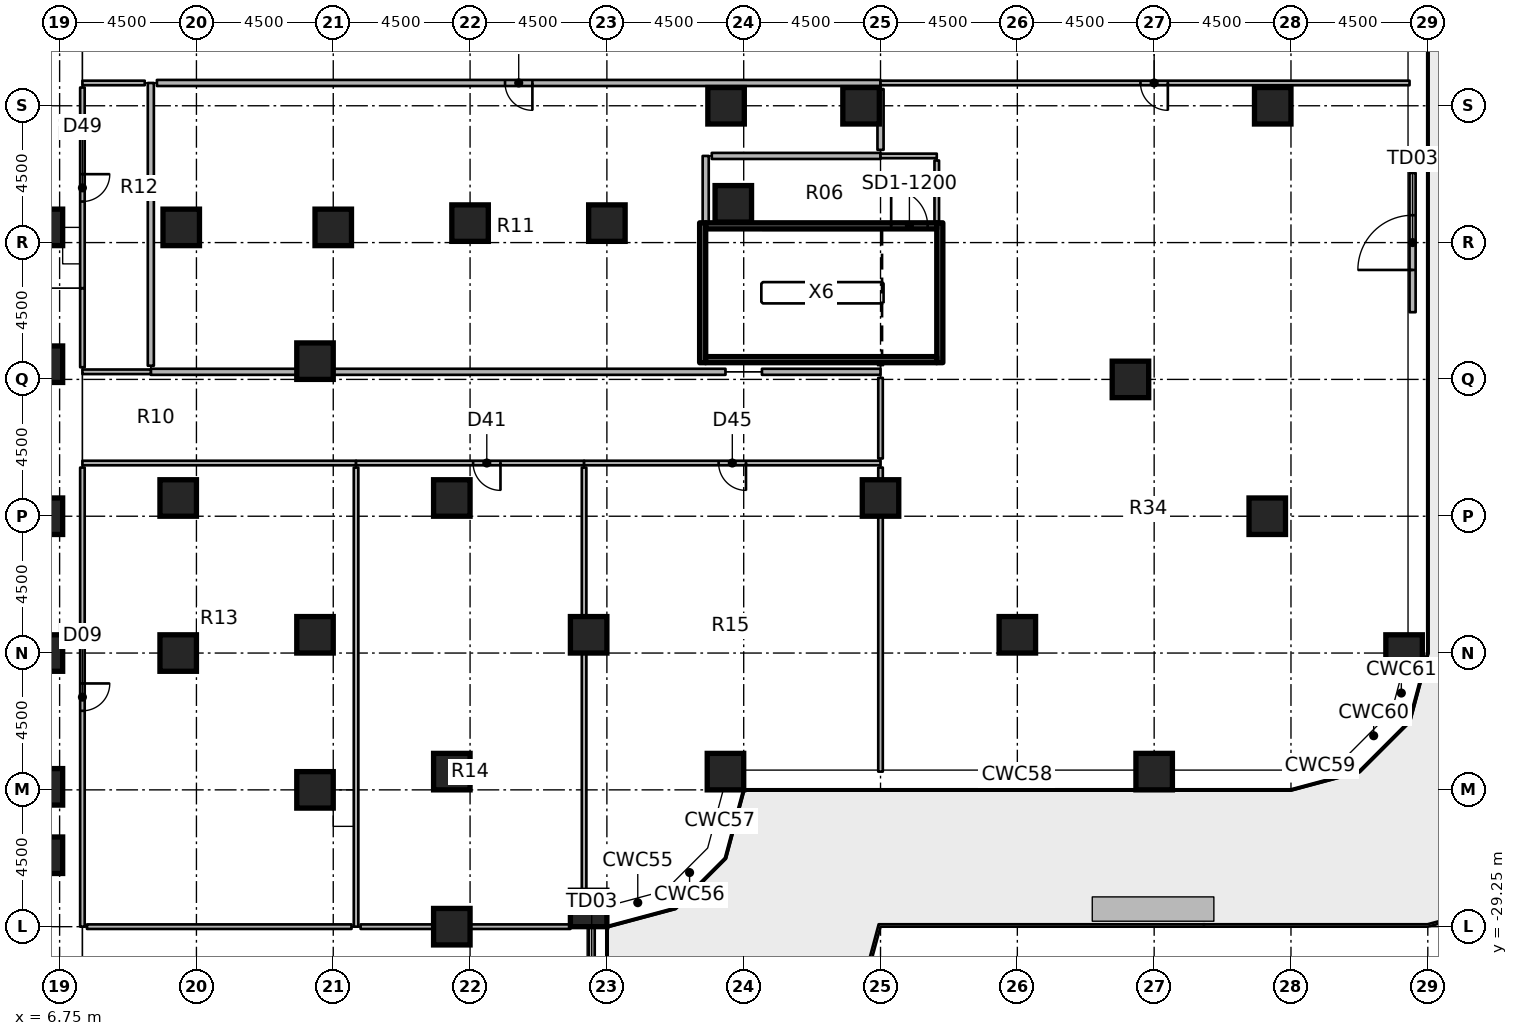
"""IFC4 building model, lengths in metres.
Left out: names, types, materials, properties, quantities, classifications, styles, units other than length and angle.
Written with IfcOpenShell. Run it as: python <this file> out.ifc"""

import sys

from ifc_helpers import new_model, si_unit, direction, frame, frame_2d, origin, origin_2d, place, context, subcontext, project, spatial, rectangle, extrude, element, fill, save


model = new_model("IFC4")
c1 = context("Model", 3, precision=1e-05, world=origin(), true_north=direction((0.0, 1.0)))
c2 = subcontext(c1, "Body", "Model", "MODEL_VIEW")
j1 = project(units=[si_unit("LENGTHUNIT", "METRE"), si_unit("PLANEANGLEUNIT", "RADIAN")], contexts=[c1])
p1 = place(None, origin())
s1 = spatial("IfcSite", under=j1, at=p1, CompositionType="ELEMENT")
p2 = place(p1, origin())
s2 = spatial("IfcBuilding", under=s1, at=p2, CompositionType="ELEMENT")
p3 = place(p2, frame((0.0, 0.0, 7.0)))
s3 = spatial("IfcBuildingStorey", under=s2, at=p3, CompositionType="ELEMENT", Elevation=7.0)
for number, where, z_axis, x_axis in (
    (1, (6.25, -26.9, 0.0), (0.0, 0.0, 1.0), (1.0, 0.0, 0.0)),
    (2, (6.25, -24.65, 0.0), (0.0, 0.0, 1.0), (1.0, 0.0, 0.0)),
    (3, (6.25, -20.25, 0.0), (0.0, 0.0, 1.0), (1.0, 0.0, 0.0)),
    (4, (6.25, -15.75, 0.0), (0.0, 0.0, 1.0), (1.0, 0.0, 0.0)),
    (5, (6.25, -10.75, 0.0), (0.0, 0.0, 1.0), (1.0, 0.0, 0.0)),
    (6, (6.25, -6.25, 0.0), (0.0, 0.0, 1.0), (1.0, 0.0, 0.0)),
    (7, (10.65, -20.25, 0.0), (0.0, 0.0, 1.0), (1.0, 0.0, 0.0)),
    (8, (10.65, -15.15, 0.0), (0.0, 0.0, 1.0), (1.0, 0.0, 0.0)),
    (9, (10.75, -6.25, 0.0), (0.0, 0.0, 1.0), (1.0, 0.0, 0.0)),
    (10, (15.15, -24.75, 0.0), (0.0, 0.0, 1.0), (1.0, 0.0, 0.0)),
    (11, (15.15, -19.65, 0.0), (0.0, 0.0, 1.0), (1.0, 0.0, 0.0)),
    (12, (15.15, -10.65, 0.0), (0.0, 0.0, 1.0), (1.0, 0.0, 0.0)),
    (13, (15.75, -6.25, 0.0), (0.0, 0.0, 1.0), (1.0, 0.0, 0.0)),
    (14, (19.65, -29.25, 0.0), (0.0, 0.0, 1.0), (1.0, 0.0, 0.0)),
    (15, (19.65, -24.15, 0.0), (0.0, 0.0, 1.0), (1.0, 0.0, 0.0)),
    (16, (19.65, -15.15, 0.0), (0.0, 0.0, 1.0), (1.0, 0.0, 0.0)),
    (17, (20.25, -6.11, 0.0), (0.0, 0.0, 1.0), (1.0, 0.0, 0.0)),
    (18, (24.15, -28.65, 0.0), (0.0, 0.0, 1.0), (1.0, 0.0, 0.0)),
    (19, (24.15, -19.65, 0.0), (0.0, 0.0, 1.0), (1.0, 0.0, 0.0)),
    (20, (24.75, -6.11, 0.0), (0.0, 0.0, 1.0), (1.0, 0.0, 0.0)),
    (21, (28.65, -24.15, 0.0), (0.0, 0.0, 1.0), (1.0, 0.0, 0.0)),
    (22, (28.908, -5.475, 0.0), (0.0, 0.0, 1.0), (1.0, 0.0, 0.0)),
    (23, (28.67, -2.25, 0.0), (0.0, 0.0, 1.0), (1.0, 0.0, 0.0)),
    (24, (33.75, -15.15, 0.0), (0.0, 0.0, 1.0), (1.0, 0.0, 0.0)),
    (25, (33.11, -2.25, 0.0), (0.0, 0.0, 1.0), (1.0, 0.0, 0.0)),
    (26, (38.25, -19.65, 0.0), (0.0, 0.0, 1.0), (1.0, 0.0, 0.0)),
    (27, (42.75, -24.15, 0.0), (0.0, 0.0, 1.0), (1.0, 0.0, 0.0)),
    (28, (41.97, -11.25, 0.0), (0.0, 0.0, 1.0), (1.0, 0.0, 0.0)),
    (29, (46.47, -15.75, 0.0), (0.0, 0.0, 1.0), (1.0, 0.0, 0.0)),
    (30, (46.65, -2.25, 0.0), (0.0, 0.0, 1.0), (1.0, 0.0, 0.0)),
    (31, (50.97, -20.25, 0.0), (0.0, 0.0, 1.0), (1.0, 0.0, 0.0)),
):
    element("IfcColumn", number, at=place(p3, frame(where, z_axis=z_axis, x_axis=x_axis)), inside=s3, PredefinedType="COLUMN", context=c2, shape_type="SweptSolid", body=[
        extrude(rectangle(XDim=1.2, YDim=1.2, at=origin_2d()), origin(), (0.0, 0.0, 1.0), 4.55),
    ])
p4 = place(p3, frame((24.25, -33.15, 0.0), z_axis=(0.0, 0.0, 1.0), x_axis=(0.0, 1.0, 0.0)))
e32 = element("IfcWall", 32, at=p4, inside=s3, PredefinedType="SOLIDWALL", context=c2, shape_type="SweptSolid", body=[
    extrude(rectangle(XDim=3.9, YDim=0.2, at=frame_2d((1.95, 0.0))), origin(), (0.0, 0.0, 1.0), 4.55),
])
p5 = place(p4, frame((1.05, 0.0, 0.0)))
e33 = element("IfcOpeningElement", 33, at=p5, cuts=e32, PredefinedType="OPENING", context=c2, shape_type="SweptSolid", body=[
    extrude(rectangle(XDim=1.8, YDim=2.4, at=frame_2d((0.9, 1.2))), frame((0.0, 0.11, 0.0), z_axis=(0.0, -1.0, 0.0), x_axis=(1.0, 0.0, 0.0)), (0.0, 0.0, 1.0), 0.22),
])
p6 = place(p3, frame((51.25, -9.04, 0.0), z_axis=(0.0, 0.0, 1.0), x_axis=(0.0, 1.0, 0.0)))
e34 = element("IfcWall", 34, at=p6, inside=s3, PredefinedType="SOLIDWALL", context=c2, shape_type="SweptSolid", body=[
    extrude(rectangle(XDim=4.58, YDim=0.2, at=frame_2d((2.29, 0.0))), origin(), (0.0, 0.0, 1.0), 4.55),
])
p7 = place(p6, frame((1.39, 0.0, 0.0)))
e35 = element("IfcOpeningElement", 35, at=p7, cuts=e34, PredefinedType="OPENING", context=c2, shape_type="SweptSolid", body=[
    extrude(rectangle(XDim=1.8, YDim=2.4, at=frame_2d((0.9, 1.2))), frame((0.0, 0.11, 0.0), z_axis=(0.0, -1.0, 0.0), x_axis=(1.0, 0.0, 0.0)), (0.0, 0.0, 1.0), 0.22),
])
for number, where, z_axis, x_axis in (
    (36, (27.9, -10.7, 0.0), (0.0, 0.0, 1.0), (0.0, 1.0, 0.0)),
    (37, (35.7, -10.7, 0.0), (0.0, 0.0, 1.0), (0.0, 1.0, 0.0)),
):
    element("IfcWall", number, at=place(p3, frame(where, z_axis=z_axis, x_axis=x_axis)), inside=s3, PredefinedType="SHEAR", context=c2, shape_type="SweptSolid", body=[
        extrude(rectangle(XDim=4.6, YDim=0.2, at=frame_2d((2.3, 0.0))), origin(), (0.0, 0.0, 1.0), 4.55),
    ])
p8 = place(p3, frame((28.0, -10.6, 0.0), z_axis=(0.0, 0.0, 1.0), x_axis=(1.0, 0.0, 0.0)))
e38 = element("IfcWall", 38, at=p8, inside=s3, PredefinedType="SHEAR", context=c2, shape_type="SweptSolid", body=[
    extrude(rectangle(XDim=7.6, YDim=0.2, at=frame_2d((3.8, 0.0))), origin(), (0.0, 0.0, 1.0), 4.55),
])
p9 = place(p3, frame((28.0, -6.2, 0.0), z_axis=(0.0, 0.0, 1.0), x_axis=(1.0, 0.0, 0.0)))
e39 = element("IfcWall", 39, at=p9, inside=s3, PredefinedType="SHEAR", context=c2, shape_type="SweptSolid", body=[
    extrude(rectangle(XDim=7.6, YDim=0.2, at=frame_2d((3.8, 0.0))), origin(), (0.0, 0.0, 1.0), 4.55),
])
p10 = place(p9, frame((6.1, 0.0, 0.0)))
e40 = element("IfcOpeningElement", 40, at=p10, cuts=e39, PredefinedType="OPENING", context=c2, shape_type="SweptSolid", body=[
    extrude(rectangle(XDim=1.2, YDim=2.1, at=frame_2d((0.6, 1.05))), frame((0.0, 0.11, 0.0), z_axis=(0.0, -1.0, 0.0), x_axis=(1.0, 0.0, 0.0)), (0.0, 0.0, 1.0), 0.22),
])
p11 = place(p3, frame((28.0, -6.1, 0.0), z_axis=(0.0, 0.0, 1.0), x_axis=(0.0, 1.0, 0.0)))
e41 = element("IfcWall", 41, at=p11, inside=s3, PredefinedType="PARTITIONING", context=c2, shape_type="SweptSolid", body=[
    extrude(rectangle(XDim=2.2, YDim=0.2, at=frame_2d((1.1, 0.0))), origin(), (0.0, 0.0, 1.0), 4.55),
])
p12 = place(p3, frame((28.2, -3.9, 0.0), z_axis=(0.0, 0.0, 1.0), x_axis=(1.0, 0.0, 0.0)))
e42 = element("IfcWall", 42, at=p12, inside=s3, PredefinedType="PARTITIONING", context=c2, shape_type="SweptSolid", body=[
    extrude(rectangle(XDim=5.55, YDim=0.2, at=frame_2d((2.775, 0.0))), origin(), (0.0, 0.0, 1.0), 4.55),
])
p13 = place(p3, frame((33.75, -3.9, 0.0), z_axis=(0.0, 0.0, 1.0), x_axis=(1.0, 0.0, 0.0)))
e43 = element("IfcWall", 43, at=p13, inside=s3, PredefinedType="PARTITIONING", context=c2, shape_type="SweptSolid", body=[
    extrude(rectangle(XDim=1.85, YDim=0.15, at=frame_2d((0.925, 0.0))), origin(), (0.0, 0.0, 1.0), 4.55),
])
p14 = place(p3, frame((35.6, -4.05, 0.0), z_axis=(0.0, 0.0, 1.0), x_axis=(0.0, -1.0, 0.0)))
e44 = element("IfcWall", 44, at=p14, inside=s3, PredefinedType="PARTITIONING", context=c2, shape_type="SweptSolid", body=[
    extrude(rectangle(XDim=2.05, YDim=0.15, at=frame_2d((1.025, 0.0))), origin(), (0.0, 0.0, 1.0), 4.55),
])
p15 = place(p3, frame((9.75, -11.0, 0.0), z_axis=(0.0, 0.0, 1.0), x_axis=(1.0, 0.0, 0.0)))
e45 = element("IfcWall", 45, at=p15, inside=s3, PredefinedType="PARTITIONING", context=c2, shape_type="SweptSolid", body=[
    extrude(rectangle(XDim=4.8, YDim=0.2, at=frame_2d((2.4, 0.0))), origin(), (0.0, 0.0, 1.0), 4.55),
])
p16 = place(p3, frame((15.75, -11.0, 0.0), z_axis=(0.0, 0.0, 1.0), x_axis=(1.0, 0.0, 0.0)))
e46 = element("IfcWall", 46, at=p16, inside=s3, PredefinedType="PARTITIONING", context=c2, shape_type="SweptSolid", body=[
    extrude(rectangle(XDim=12.9, YDim=0.2, at=frame_2d((6.45, 0.0))), origin(), (0.0, 0.0, 1.0), 4.55),
])
p17 = place(p3, frame((29.85, -11.0, 0.0), z_axis=(0.0, 0.0, 1.0), x_axis=(1.0, 0.0, 0.0)))
e47 = element("IfcWall", 47, at=p17, inside=s3, PredefinedType="PARTITIONING", context=c2, shape_type="SweptSolid", body=[
    extrude(rectangle(XDim=3.9, YDim=0.2, at=frame_2d((1.95, 0.0))), origin(), (0.0, 0.0, 1.0), 4.55),
])
p18 = place(p3, frame((7.5, -11.0, 0.0), z_axis=(0.0, 0.0, 1.0), x_axis=(1.0, 0.0, 0.0)))
e48 = element("IfcWall", 48, at=p18, inside=s3, PredefinedType="PARTITIONING", context=c2, shape_type="SweptSolid", body=[
    extrude(rectangle(XDim=2.25, YDim=0.15, at=frame_2d((1.125, 0.0))), origin(), (0.0, 0.0, 1.0), 4.55),
])
p19 = place(p3, frame((16.5, -14.0, 0.0), z_axis=(0.0, 0.0, 1.0), x_axis=(-1.0, 0.0, 0.0)))
e49 = element("IfcWall", 49, at=p19, inside=s3, PredefinedType="PARTITIONING", context=c2, shape_type="SweptSolid", body=[
    extrude(rectangle(XDim=9.0, YDim=0.15, at=frame_2d((4.5, 0.0))), origin(), (0.0, 0.0, 1.0), 4.55),
])
p20 = place(p3, frame((24.0, -14.0, 0.0), z_axis=(0.0, 0.0, 1.0), x_axis=(-1.0, 0.0, 0.0)))
e50 = element("IfcWall", 50, at=p20, inside=s3, PredefinedType="PARTITIONING", context=c2, shape_type="SweptSolid", body=[
    extrude(rectangle(XDim=7.5, YDim=0.15, at=frame_2d((3.75, 0.0))), origin(), (0.0, 0.0, 1.0), 4.55),
])
p21 = place(p20, frame((2.75, 0.0, 0.0)))
e51 = element("IfcOpeningElement", 51, at=p21, cuts=e50, PredefinedType="OPENING", context=c2, shape_type="SweptSolid", body=[
    extrude(rectangle(XDim=0.9, YDim=2.1, at=frame_2d((0.45, 1.05))), frame((0.0, 0.085, 0.0), z_axis=(0.0, -1.0, 0.0), x_axis=(1.0, 0.0, 0.0)), (0.0, 0.0, 1.0), 0.17),
])
p22 = place(p3, frame((33.75, -14.0, 0.0), z_axis=(0.0, 0.0, 1.0), x_axis=(-1.0, 0.0, 0.0)))
e52 = element("IfcWall", 52, at=p22, inside=s3, PredefinedType="PARTITIONING", context=c2, shape_type="SweptSolid", body=[
    extrude(rectangle(XDim=9.75, YDim=0.15, at=frame_2d((4.875, 0.0))), origin(), (0.0, 0.0, 1.0), 4.55),
])
p23 = place(p22, frame((4.425, 0.0, 0.0)))
e53 = element("IfcOpeningElement", 53, at=p23, cuts=e52, PredefinedType="OPENING", context=c2, shape_type="SweptSolid", body=[
    extrude(rectangle(XDim=0.9, YDim=2.1, at=frame_2d((0.45, 1.05))), frame((0.0, 0.085, 0.0), z_axis=(0.0, -1.0, 0.0), x_axis=(1.0, 0.0, 0.0)), (0.0, 0.0, 1.0), 0.17),
])
p24 = place(p3, frame((33.75, -11.2, 0.0), z_axis=(0.0, 0.0, 1.0), x_axis=(0.0, -1.0, 0.0)))
e54 = element("IfcWall", 54, at=p24, inside=s3, PredefinedType="PARTITIONING", context=c2, shape_type="SweptSolid", body=[
    extrude(rectangle(XDim=2.65, YDim=0.15, at=frame_2d((1.325, 0.0))), origin(), (0.0, 0.0, 1.0), 4.55),
])
p25 = place(p3, frame((9.75, -10.8, 0.0), z_axis=(0.0, 0.0, 1.0), x_axis=(0.0, 1.0, 0.0)))
e55 = element("IfcWall", 55, at=p25, inside=s3, PredefinedType="PARTITIONING", context=c2, shape_type="SweptSolid", body=[
    extrude(rectangle(XDim=9.3, YDim=0.2, at=frame_2d((4.65, 0.0))), origin(), (0.0, 0.0, 1.0), 4.55),
])
p26 = place(p3, frame((33.75, -1.5, 0.0), z_axis=(0.0, 0.0, 1.0), x_axis=(-1.0, 0.0, 0.0)))
e56 = element("IfcWall", 56, at=p26, inside=s3, PredefinedType="PARTITIONING", context=c2, shape_type="SweptSolid", body=[
    extrude(rectangle(XDim=23.8, YDim=0.2, at=frame_2d((11.9, 0.0))), origin(), (0.0, 0.0, 1.0), 4.55),
])
p27 = place(p26, frame((11.45, 0.0, 0.0)))
e57 = element("IfcOpeningElement", 57, at=p27, cuts=e56, PredefinedType="OPENING", context=c2, shape_type="SweptSolid", body=[
    extrude(rectangle(XDim=0.9, YDim=2.1, at=frame_2d((0.45, 1.05))), frame((0.0, 0.11, 0.0), z_axis=(0.0, -1.0, 0.0), x_axis=(1.0, 0.0, 0.0)), (0.0, 0.0, 1.0), 0.22),
])
p28 = place(p3, frame((33.75, -1.7, 0.0), z_axis=(0.0, 0.0, 1.0), x_axis=(0.0, -1.0, 0.0)))
e58 = element("IfcWall", 58, at=p28, inside=s3, PredefinedType="PARTITIONING", context=c2, shape_type="SweptSolid", body=[
    extrude(rectangle(XDim=2.0, YDim=0.2, at=frame_2d((1.0, 0.0))), origin(), (0.0, 0.0, 1.0), 4.55),
])
p29 = place(p3, frame((7.5, -10.85, 0.0), z_axis=(0.0, 0.0, 1.0), x_axis=(0.0, 1.0, 0.0)))
e59 = element("IfcWall", 59, at=p29, inside=s3, PredefinedType="PARTITIONING", context=c2, shape_type="SweptSolid", body=[
    extrude(rectangle(XDim=2.6, YDim=0.15, at=frame_2d((1.3, 0.0))), origin(), (0.0, 0.0, 1.0), 4.55),
])
p30 = place(p3, frame((7.5, -1.5, 0.0), z_axis=(0.0, 0.0, 1.0), x_axis=(1.0, 0.0, 0.0)))
e60 = element("IfcWall", 60, at=p30, inside=s3, PredefinedType="PARTITIONING", context=c2, shape_type="SweptSolid", body=[
    extrude(rectangle(XDim=2.05, YDim=0.15, at=frame_2d((1.025, 0.0))), origin(), (0.0, 0.0, 1.0), 4.55),
])
p31 = place(p3, frame((7.5, -1.65, 0.0), z_axis=(0.0, 0.0, 1.0), x_axis=(0.0, -1.0, 0.0)))
e61 = element("IfcWall", 61, at=p31, inside=s3, PredefinedType="PARTITIONING", context=c2, shape_type="SweptSolid", body=[
    extrude(rectangle(XDim=6.6, YDim=0.15, at=frame_2d((3.3, 0.0))), origin(), (0.0, 0.0, 1.0), 4.55),
])
p32 = place(p31, frame((2.85, 0.0, 0.0)))
e62 = element("IfcOpeningElement", 62, at=p32, cuts=e61, PredefinedType="OPENING", context=c2, shape_type="SweptSolid", body=[
    extrude(rectangle(XDim=0.9, YDim=2.1, at=frame_2d((0.45, 1.05))), frame((0.0, 0.085, 0.0), z_axis=(0.0, -1.0, 0.0), x_axis=(1.0, 0.0, 0.0)), (0.0, 0.0, 1.0), 0.17),
])
p33 = place(p3, frame((16.5, -14.15, 0.0), z_axis=(0.0, 0.0, 1.0), x_axis=(0.0, -1.0, 0.0)))
e63 = element("IfcWall", 63, at=p33, inside=s3, PredefinedType="PARTITIONING", context=c2, shape_type="SweptSolid", body=[
    extrude(rectangle(XDim=15.1, YDim=0.15, at=frame_2d((7.55, 0.0))), origin(), (0.0, 0.0, 1.0), 4.55),
])
p34 = place(p3, frame((7.5, -14.15, 0.0), z_axis=(0.0, 0.0, 1.0), x_axis=(0.0, -1.0, 0.0)))
e64 = element("IfcWall", 64, at=p34, inside=s3, PredefinedType="PARTITIONING", context=c2, shape_type="SweptSolid", body=[
    extrude(rectangle(XDim=15.1, YDim=0.15, at=frame_2d((7.55, 0.0))), origin(), (0.0, 0.0, 1.0), 4.55),
])
p35 = place(p34, frame((7.1, 0.0, 0.0)))
e65 = element("IfcOpeningElement", 65, at=p35, cuts=e64, PredefinedType="OPENING", context=c2, shape_type="SweptSolid", body=[
    extrude(rectangle(XDim=0.9, YDim=2.1, at=frame_2d((0.45, 1.05))), frame((0.0, 0.085, 0.0), z_axis=(0.0, -1.0, 0.0), x_axis=(1.0, 0.0, 0.0)), (0.0, 0.0, 1.0), 0.17),
])
p36 = place(p3, frame((16.35, -29.25, 0.0), z_axis=(0.0, 0.0, 1.0), x_axis=(-1.0, 0.0, 0.0)))
e66 = element("IfcWall", 66, at=p36, inside=s3, PredefinedType="PARTITIONING", context=c2, shape_type="SweptSolid", body=[
    extrude(rectangle(XDim=8.7, YDim=0.15, at=frame_2d((4.35, 0.0))), origin(), (0.0, 0.0, 1.0), 4.55),
])
p37 = place(p3, frame((24.0, -14.15, 0.0), z_axis=(0.0, 0.0, 1.0), x_axis=(0.0, -1.0, 0.0)))
e67 = element("IfcWall", 67, at=p37, inside=s3, PredefinedType="PARTITIONING", context=c2, shape_type="SweptSolid", body=[
    extrude(rectangle(XDim=4.9, YDim=0.15, at=frame_2d((2.45, 0.0))), origin(), (0.0, 0.0, 1.0), 4.55),
])
p38 = place(p3, frame((24.0, -20.25, 0.0), z_axis=(0.0, 0.0, 1.0), x_axis=(0.0, -1.0, 0.0)))
e68 = element("IfcWall", 68, at=p38, inside=s3, PredefinedType="PARTITIONING", context=c2, shape_type="SweptSolid", body=[
    extrude(rectangle(XDim=7.8, YDim=0.15, at=frame_2d((3.9, 0.0))), origin(), (0.0, 0.0, 1.0), 4.55),
])
p39 = place(p3, frame((23.55, -29.25, 0.0), z_axis=(0.0, 0.0, 1.0), x_axis=(-1.0, 0.0, 0.0)))
e69 = element("IfcWall", 69, at=p39, inside=s3, PredefinedType="PARTITIONING", context=c2, shape_type="SweptSolid", body=[
    extrude(rectangle(XDim=3.3, YDim=0.15, at=frame_2d((1.65, 0.0))), origin(), (0.0, 0.0, 1.0), 4.55),
])
p40 = place(p3, frame((19.05, -29.25, 0.0), z_axis=(0.0, 0.0, 1.0), x_axis=(-1.0, 0.0, 0.0)))
e70 = element("IfcWall", 70, at=p40, inside=s3, PredefinedType="PARTITIONING", context=c2, shape_type="SweptSolid", body=[
    extrude(rectangle(XDim=2.4, YDim=0.15, at=frame_2d((1.2, 0.0))), origin(), (0.0, 0.0, 1.0), 4.55),
])
p41 = place(p3, frame((33.75, -14.15, 0.0), z_axis=(0.0, 0.0, 1.0), x_axis=(0.0, -1.0, 0.0)))
e71 = element("IfcWall", 71, at=p41, inside=s3, PredefinedType="PARTITIONING", context=c2, shape_type="SweptSolid", body=[
    extrude(rectangle(XDim=0.4, YDim=0.15, at=frame_2d((0.2, 0.0))), origin(), (0.0, 0.0, 1.0), 4.55),
])
p42 = place(p3, frame((33.75, -15.75, 0.0), z_axis=(0.0, 0.0, 1.0), x_axis=(0.0, -1.0, 0.0)))
e72 = element("IfcWall", 72, at=p42, inside=s3, PredefinedType="PARTITIONING", context=c2, shape_type="SweptSolid", body=[
    extrude(rectangle(XDim=8.4, YDim=0.15, at=frame_2d((4.2, 0.0))), origin(), (0.0, 0.0, 1.0), 4.55),
])
p43 = place(p3, frame((51.15, -1.5, 0.0), z_axis=(0.0, 0.0, 1.0), x_axis=(-1.0, 0.0, 0.0)))
e73 = element("IfcWall", 73, at=p43, inside=s3, PredefinedType="PARTITIONING", context=c2, shape_type="SweptSolid", body=[
    extrude(rectangle(XDim=17.4, YDim=0.15, at=frame_2d((8.7, 0.0))), origin(), (0.0, 0.0, 1.0), 4.55),
])
p44 = place(p43, frame((7.95, 0.0, 0.0)))
e74 = element("IfcOpeningElement", 74, at=p44, cuts=e73, PredefinedType="OPENING", context=c2, shape_type="SweptSolid", body=[
    extrude(rectangle(XDim=0.9, YDim=2.1, at=frame_2d((0.45, 1.05))), frame((0.0, 0.085, 0.0), z_axis=(0.0, -1.0, 0.0), x_axis=(1.0, 0.0, 0.0)), (0.0, 0.0, 1.0), 0.17),
])
p45 = place(p7, origin())
e75 = element("IfcDoor", 75, at=p45, inside=s3, OperationType="SINGLE_SWING_LEFT", PredefinedType="DOOR", context=c2, shape_type="SweptSolid", body=[
    extrude(rectangle(XDim=1.8, YDim=2.4, at=frame_2d((0.9, 1.2))), frame((0.0, 0.025, 0.0), z_axis=(0.0, -1.0, 0.0), x_axis=(1.0, 0.0, 0.0)), (0.0, 0.0, 1.0), 0.05),
])
fill(e35, e75)
p46 = place(p10, origin())
e76 = element("IfcDoor", 76, at=p46, inside=s3, OperationType="SINGLE_SWING_RIGHT", PredefinedType="DOOR", context=c2, shape_type="SweptSolid", body=[
    extrude(rectangle(XDim=1.2, YDim=2.1, at=frame_2d((0.6, 1.05))), frame((0.0, 0.025, 0.0), z_axis=(0.0, -1.0, 0.0), x_axis=(1.0, 0.0, 0.0)), (0.0, 0.0, 1.0), 0.05),
])
fill(e40, e76)
p47 = place(p21, origin())
e77 = element("IfcDoor", 77, at=p47, inside=s3, OperationType="SINGLE_SWING_LEFT", PredefinedType="DOOR", context=c2, shape_type="SweptSolid", body=[
    extrude(rectangle(XDim=0.9, YDim=2.1, at=frame_2d((0.45, 1.05))), frame((0.0, 0.025, 0.0), z_axis=(0.0, -1.0, 0.0), x_axis=(1.0, 0.0, 0.0)), (0.0, 0.0, 1.0), 0.05),
])
fill(e51, e77)
p48 = place(p23, origin())
e78 = element("IfcDoor", 78, at=p48, inside=s3, OperationType="SINGLE_SWING_LEFT", PredefinedType="DOOR", context=c2, shape_type="SweptSolid", body=[
    extrude(rectangle(XDim=0.9, YDim=2.1, at=frame_2d((0.45, 1.05))), frame((0.0, 0.025, 0.0), z_axis=(0.0, -1.0, 0.0), x_axis=(1.0, 0.0, 0.0)), (0.0, 0.0, 1.0), 0.05),
])
fill(e53, e78)
p49 = place(p27, origin())
e79 = element("IfcDoor", 79, at=p49, inside=s3, OperationType="SINGLE_SWING_LEFT", PredefinedType="DOOR", context=c2, shape_type="SweptSolid", body=[
    extrude(rectangle(XDim=0.9, YDim=2.1, at=frame_2d((0.45, 1.05))), frame((0.0, 0.025, 0.0), z_axis=(0.0, -1.0, 0.0), x_axis=(1.0, 0.0, 0.0)), (0.0, 0.0, 1.0), 0.05),
])
fill(e57, e79)
p50 = place(p32, origin())
e80 = element("IfcDoor", 80, at=p50, inside=s3, OperationType="SINGLE_SWING_LEFT", PredefinedType="DOOR", context=c2, shape_type="SweptSolid", body=[
    extrude(rectangle(XDim=0.9, YDim=2.1, at=frame_2d((0.45, 1.05))), frame((0.0, 0.025, 0.0), z_axis=(0.0, -1.0, 0.0), x_axis=(1.0, 0.0, 0.0)), (0.0, 0.0, 1.0), 0.05),
])
fill(e62, e80)
p51 = place(p35, origin())
e81 = element("IfcDoor", 81, at=p51, inside=s3, OperationType="SINGLE_SWING_LEFT", PredefinedType="DOOR", context=c2, shape_type="SweptSolid", body=[
    extrude(rectangle(XDim=0.9, YDim=2.1, at=frame_2d((0.45, 1.05))), frame((0.0, 0.025, 0.0), z_axis=(0.0, -1.0, 0.0), x_axis=(1.0, 0.0, 0.0)), (0.0, 0.0, 1.0), 0.05),
])
fill(e65, e81)
p52 = place(p44, origin())
e82 = element("IfcDoor", 82, at=p52, inside=s3, OperationType="SINGLE_SWING_LEFT", PredefinedType="DOOR", context=c2, shape_type="SweptSolid", body=[
    extrude(rectangle(XDim=0.9, YDim=2.1, at=frame_2d((0.45, 1.05))), frame((0.0, 0.025, 0.0), z_axis=(0.0, -1.0, 0.0), x_axis=(1.0, 0.0, 0.0)), (0.0, 0.0, 1.0), 0.05),
])
fill(e74, e82)
save(model, sys.argv[1])
